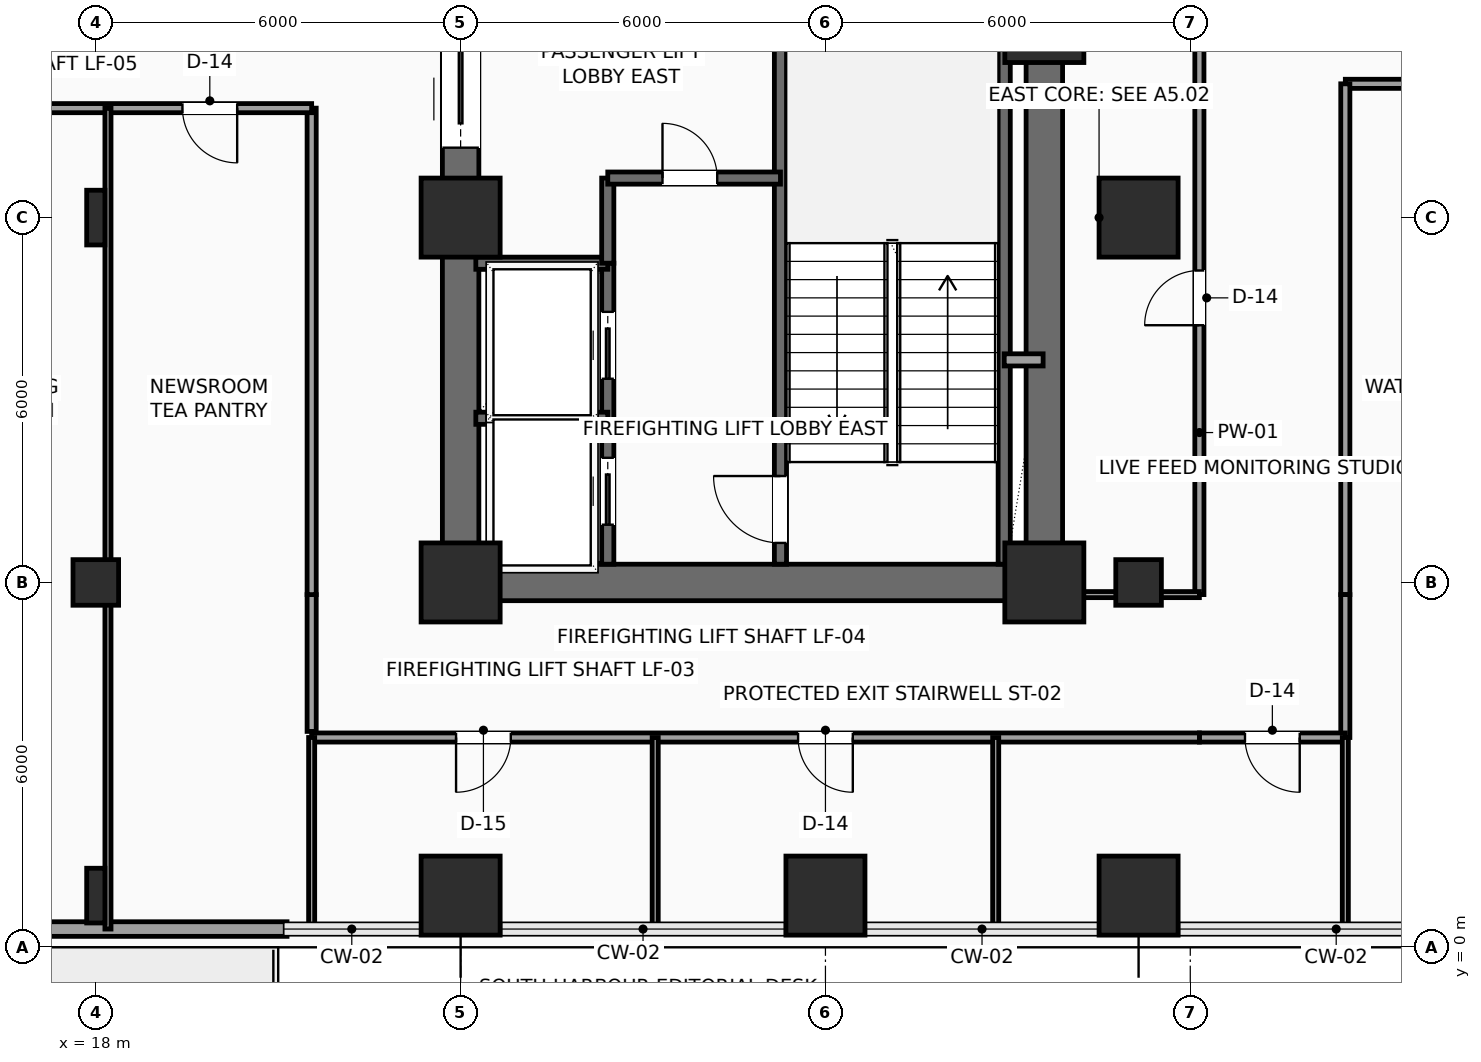
"""IFC4 building model, lengths in metres.
Left out: names, types, materials, properties, quantities, classifications, styles, units other than length and angle.
Written with IfcOpenShell. Run it as: python <this file> out.ifc"""

import sys

from ifc_helpers import new_model, si_unit, direction, frame, frame_2d, origin, origin_2d, place, context, subcontext, project, spatial, rectangle, hollow_rectangle, i_section, extrude, element, fill, save


model = new_model("IFC4")
c1 = context("Model", 3, precision=1e-05, world=origin(), true_north=direction((0.0, 1.0)))
c2 = subcontext(c1, "Body", "Model", "MODEL_VIEW")
j1 = project(units=[si_unit("LENGTHUNIT", "METRE"), si_unit("PLANEANGLEUNIT", "RADIAN")], contexts=[c1])
p1 = place(None, origin())
s1 = spatial("IfcSite", under=j1, at=p1, CompositionType="ELEMENT")
p2 = place(p1, origin())
s2 = spatial("IfcBuilding", under=s1, at=p2, CompositionType="ELEMENT")
p3 = place(p2, frame((0.0, 0.0, 36.3)))
s3 = spatial("IfcBuildingStorey", under=s2, at=p3, CompositionType="ELEMENT", Elevation=36.3)
for number, where, z_axis, x_axis in (
    (1, (24.0, 6.0, 0.0), (0.0, 0.0, 1.0), (1.0, 0.0, 0.0)),
    (2, (24.0, 12.0, 0.0), (0.0, 0.0, 1.0), (1.0, 0.0, 0.0)),
    (3, (33.6, 6.0, 0.0), (0.0, 0.0, 1.0), (1.0, 0.0, 0.0)),
    (4, (33.6, 15.2, 0.0), (0.0, 0.0, 1.0), (1.0, 0.0, 0.0)),
):
    element("IfcColumn", number, at=place(p3, frame(where, z_axis=z_axis, x_axis=x_axis)), inside=s3, PredefinedType="COLUMN", context=c2, shape_type="SweptSolid", body=[
        extrude(rectangle(XDim=1.3, YDim=1.3, at=origin_2d()), origin(), (0.0, 0.0, 1.0), 3.9),
    ])
p4 = place(p3, frame((18.0, 0.85, 0.0), z_axis=(0.0, 0.0, 1.0), x_axis=(1.0, 0.0, 0.0)))
e5 = element("IfcColumn", 5, at=p4, inside=s3, PredefinedType="COLUMN", context=c2, shape_type="SweptSolid", body=[
    extrude(i_section(OverallWidth=0.3, OverallDepth=0.9, WebThickness=0.019, FlangeThickness=0.035, FilletRadius=0.03, at=origin_2d()), origin(), (0.0, 0.0, 1.0), 3.9),
])
p5 = place(p3, frame((18.0, 6.0, 0.0), z_axis=(0.0, 0.0, 1.0), x_axis=(1.0, 0.0, 0.0)))
e6 = element("IfcColumn", 6, at=p5, inside=s3, PredefinedType="COLUMN", context=c2, shape_type="SweptSolid", body=[
    extrude(hollow_rectangle(XDim=0.75, YDim=0.75, WallThickness=0.035, InnerFilletRadius=0.035, OuterFilletRadius=0.05, at=origin_2d()), origin(), (0.0, 0.0, 1.0), 3.9),
])
p6 = place(p3, frame((18.0, 12.0, 0.0), z_axis=(0.0, 0.0, 1.0), x_axis=(1.0, 0.0, 0.0)))
e7 = element("IfcColumn", 7, at=p6, inside=s3, PredefinedType="COLUMN", context=c2, shape_type="SweptSolid", body=[
    extrude(i_section(OverallWidth=0.3, OverallDepth=0.9, WebThickness=0.019, FlangeThickness=0.035, FilletRadius=0.03, at=origin_2d()), origin(), (0.0, 0.0, 1.0), 3.9),
])
for number, where, z_axis, x_axis in (
    (8, (24.0, 0.85, 0.0), (0.0, 0.0, 1.0), (1.0, 0.0, 0.0)),
    (9, (30.0, 0.85, 0.0), (0.0, 0.0, 1.0), (1.0, 0.0, 0.0)),
    (10, (35.15, 0.85, 0.0), (0.0, 0.0, 1.0), (1.0, 0.0, 0.0)),
):
    element("IfcColumn", number, at=place(p3, frame(where, z_axis=z_axis, x_axis=x_axis)), inside=s3, PredefinedType="COLUMN", context=c2, shape_type="SweptSolid", body=[
        extrude(rectangle(XDim=1.3, YDim=1.3, at=origin_2d()), origin(), (0.0, 0.0, 1.0), 3.9),
    ])
p7 = place(p3, frame((35.15, 6.0, 0.0), z_axis=(0.0, 0.0, 1.0), x_axis=(1.0, 0.0, 0.0)))
e11 = element("IfcColumn", 11, at=p7, inside=s3, PredefinedType="COLUMN", context=c2, shape_type="SweptSolid", body=[
    extrude(hollow_rectangle(XDim=0.75, YDim=0.75, WallThickness=0.035, InnerFilletRadius=0.035, OuterFilletRadius=0.05, at=origin_2d()), origin(), (0.0, 0.0, 1.0), 3.9),
])
p8 = place(p3, frame((35.15, 12.0, 0.0), z_axis=(0.0, 0.0, 1.0), x_axis=(1.0, 0.0, 0.0)))
e12 = element("IfcColumn", 12, at=p8, inside=s3, PredefinedType="COLUMN", context=c2, shape_type="SweptSolid", body=[
    extrude(rectangle(XDim=1.3, YDim=1.3, at=origin_2d()), origin(), (0.0, 0.0, 1.0), 3.9),
])
p9 = place(p3, frame((21.145, 0.3, 0.0), z_axis=(0.0, 0.0, 1.0), x_axis=(-1.0, 0.0, 0.0)))
e13 = element("IfcWall", 13, at=p9, inside=s3, PredefinedType="SOLIDWALL", context=c2, shape_type="SweptSolid", body=[
    extrude(rectangle(XDim=9.29, YDim=0.24, at=frame_2d((4.645, 0.0))), origin(), (0.0, 0.0, 1.0), 3.65),
])
p10 = place(p9, frame((3.945, 0.0, 0.0)))
e14 = element("IfcOpeningElement", 14, at=p10, cuts=e13, PredefinedType="OPENING", context=c2, shape_type="SweptSolid", body=[
    extrude(rectangle(XDim=1.05, YDim=2.2, at=frame_2d((0.525, 1.1))), frame((0.0, 0.13, 0.0), z_axis=(0.0, -1.0, 0.0), x_axis=(1.0, 0.0, 0.0)), (0.0, 0.0, 1.0), 0.26),
])
p11 = place(p3, frame((24.0, 6.0, 0.0), z_axis=(0.0, 0.0, 1.0), x_axis=(1.0, 0.0, 0.0)))
e15 = element("IfcWall", 15, at=p11, inside=s3, PredefinedType="SHEAR", context=c2, shape_type="SweptSolid", body=[
    extrude(rectangle(XDim=9.6, YDim=0.6, at=frame_2d((4.8, 0.0))), origin(), (0.0, 0.0, 1.0), 3.65),
])
p12 = place(p3, frame((24.0, 6.0, 0.0), z_axis=(0.0, 0.0, 1.0), x_axis=(0.0, 1.0, 0.0)))
e16 = element("IfcWall", 16, at=p12, inside=s3, PredefinedType="SHEAR", context=c2, shape_type="SweptSolid", body=[
    extrude(rectangle(XDim=12.0, YDim=0.6, at=frame_2d((6.0, 0.0))), origin(), (0.0, 0.0, 1.0), 3.65),
])
p13 = place(p12, frame((7.15, 0.0, 0.0)))
e17 = element("IfcOpeningElement", 17, at=p13, cuts=e16, PredefinedType="OPENING", context=c2, shape_type="SweptSolid", body=[
    extrude(rectangle(XDim=1.6, YDim=2.3, at=frame_2d((0.8, 1.15))), frame((0.0, 0.31, 0.0), z_axis=(0.0, -1.0, 0.0), x_axis=(1.0, 0.0, 0.0)), (0.0, 0.0, 1.0), 0.62),
])
p14 = place(p3, frame((33.6, 6.0, 0.0), z_axis=(0.0, 0.0, 1.0), x_axis=(0.0, 1.0, 0.0)))
e18 = element("IfcWall", 18, at=p14, inside=s3, PredefinedType="SHEAR", context=c2, shape_type="SweptSolid", body=[
    extrude(rectangle(XDim=12.0, YDim=0.6, at=frame_2d((6.0, 0.0))), origin(), (0.0, 0.0, 1.0), 3.65),
])
p15 = place(p14, frame((10.2, 0.0, 0.0)))
e19 = element("IfcOpeningElement", 19, at=p15, cuts=e18, PredefinedType="OPENING", context=c2, shape_type="SweptSolid", body=[
    extrude(rectangle(XDim=0.9, YDim=2.15, at=frame_2d((0.45, 1.075))), frame((0.0, 0.31, 0.0), z_axis=(0.0, -1.0, 0.0), x_axis=(1.0, 0.0, 0.0)), (0.0, 0.0, 1.0), 0.62),
])
p16 = place(p3, frame((29.26, 6.3, 0.0), z_axis=(0.0, 0.0, 1.0), x_axis=(0.0, 1.0, 0.0)))
e20 = element("IfcWall", 20, at=p16, inside=s3, PredefinedType="SHEAR", context=c2, shape_type="SweptSolid", body=[
    extrude(rectangle(XDim=8.88, YDim=0.2, at=frame_2d((4.44, 0.0))), origin(), (0.0, 0.0, 1.0), 3.65),
])
p17 = place(p16, frame((0.35, 0.0, 0.0)))
e21 = element("IfcOpeningElement", 21, at=p17, cuts=e20, PredefinedType="OPENING", context=c2, shape_type="SweptSolid", body=[
    extrude(rectangle(XDim=1.1, YDim=2.2, at=frame_2d((0.55, 1.1))), frame((0.0, 0.11, 0.0), z_axis=(0.0, -1.0, 0.0), x_axis=(1.0, 0.0, 0.0)), (0.0, 0.0, 1.0), 0.22),
])
p18 = place(p3, frame((32.94, 6.3, 0.0), z_axis=(0.0, 0.0, 1.0), x_axis=(0.0, 1.0, 0.0)))
e22 = element("IfcWall", 22, at=p18, inside=s3, PredefinedType="SHEAR", context=c2, shape_type="SweptSolid", body=[
    extrude(rectangle(XDim=8.88, YDim=0.2, at=frame_2d((4.44, 0.0))), origin(), (0.0, 0.0, 1.0), 3.65),
])
p19 = place(p3, frame((26.42, 6.3, 0.0), z_axis=(0.0, 0.0, 1.0), x_axis=(0.0, 1.0, 0.0)))
e23 = element("IfcWall", 23, at=p19, inside=s3, PredefinedType="SHEAR", context=c2, shape_type="SweptSolid", body=[
    extrude(rectangle(XDim=4.95, YDim=0.2, at=frame_2d((2.475, 0.0))), origin(), (0.0, 0.0, 1.0), 3.65),
])
p20 = place(p19, frame((0.65, 0.0, 0.0)))
e24 = element("IfcOpeningElement", 24, at=p20, cuts=e23, PredefinedType="OPENING", context=c2, shape_type="SweptSolid", body=[
    extrude(rectangle(XDim=1.1, YDim=2.2, at=frame_2d((0.55, 1.1))), frame((0.0, 0.11, 0.0), z_axis=(0.0, -1.0, 0.0), x_axis=(1.0, 0.0, 0.0)), (0.0, 0.0, 1.0), 0.22),
])
p21 = place(p19, frame((3.05, 0.0, 0.0)))
e25 = element("IfcOpeningElement", 25, at=p21, cuts=e23, PredefinedType="OPENING", context=c2, shape_type="SweptSolid", body=[
    extrude(rectangle(XDim=1.1, YDim=2.2, at=frame_2d((0.55, 1.1))), frame((0.0, 0.11, 0.0), z_axis=(0.0, -1.0, 0.0), x_axis=(1.0, 0.0, 0.0)), (0.0, 0.0, 1.0), 0.22),
])
for number, where, z_axis, x_axis in (
    (26, (24.25, 8.7, 0.0), (0.0, 0.0, 1.0), (1.0, 0.0, 0.0)),
    (27, (24.25, 11.25, 0.0), (0.0, 0.0, 1.0), (1.0, 0.0, 0.0)),
):
    element("IfcWall", number, at=place(p3, frame(where, z_axis=z_axis, x_axis=x_axis)), inside=s3, PredefinedType="SHEAR", context=c2, shape_type="SweptSolid", body=[
        extrude(rectangle(XDim=2.17, YDim=0.2, at=frame_2d((1.085, 0.0))), origin(), (0.0, 0.0, 1.0), 3.65),
    ])
p22 = place(p3, frame((26.42, 11.25, 0.0), z_axis=(0.0, 0.0, 1.0), x_axis=(0.0, 1.0, 0.0)))
e28 = element("IfcWall", 28, at=p22, inside=s3, PredefinedType="SHEAR", context=c2, shape_type="SweptSolid", body=[
    extrude(rectangle(XDim=1.4, YDim=0.2, at=frame_2d((0.7, 0.0))), origin(), (0.0, 0.0, 1.0), 3.65),
])
p23 = place(p3, frame((26.42, 12.65, 0.0), z_axis=(0.0, 0.0, 1.0), x_axis=(1.0, 0.0, 0.0)))
e29 = element("IfcWall", 29, at=p23, inside=s3, PredefinedType="SHEAR", context=c2, shape_type="SweptSolid", body=[
    extrude(rectangle(XDim=2.84, YDim=0.2, at=frame_2d((1.42, 0.0))), origin(), (0.0, 0.0, 1.0), 3.65),
])
p24 = place(p23, frame((0.9, 0.0, 0.0)))
e30 = element("IfcOpeningElement", 30, at=p24, cuts=e29, PredefinedType="OPENING", context=c2, shape_type="SweptSolid", body=[
    extrude(rectangle(XDim=0.9, YDim=2.15, at=frame_2d((0.45, 1.075))), frame((0.0, 0.11, 0.0), z_axis=(0.0, -1.0, 0.0), x_axis=(1.0, 0.0, 0.0)), (0.0, 0.0, 1.0), 0.22),
])
p25 = place(p3, frame((32.94, 9.66, 0.0), z_axis=(0.0, 0.0, 1.0), x_axis=(1.0, 0.0, 0.0)))
e31 = element("IfcWall", 31, at=p25, inside=s3, PredefinedType="SOLIDWALL", context=c2, shape_type="SweptSolid", body=[
    extrude(rectangle(XDim=0.64, YDim=0.2, at=frame_2d((0.32, 0.0))), origin(), (0.0, 0.0, 1.0), 3.65),
])
p26 = place(p3, frame((36.15, 5.8, 0.0), z_axis=(0.0, 0.0, 1.0), x_axis=(0.0, 1.0, 0.0)))
e32 = element("IfcWall", 32, at=p26, inside=s3, PredefinedType="PARTITIONING", context=c2, shape_type="SweptSolid", body=[
    extrude(rectangle(XDim=10.08, YDim=0.15, at=frame_2d((5.04, 0.0))), origin(), (0.0, 0.0, 1.0), 3.65),
])
p27 = place(p26, frame((4.43, 0.0, 0.0)))
e33 = element("IfcOpeningElement", 33, at=p27, cuts=e32, PredefinedType="OPENING", context=c2, shape_type="SweptSolid", body=[
    extrude(rectangle(XDim=0.9, YDim=2.1, at=frame_2d((0.45, 1.05))), frame((0.0, 0.085, 0.0), z_axis=(0.0, -1.0, 0.0), x_axis=(1.0, 0.0, 0.0)), (0.0, 0.0, 1.0), 0.17),
])
p28 = place(p3, frame((50.9, 14.2, 0.0), z_axis=(0.0, 0.0, 1.0), x_axis=(-1.0, 0.0, 0.0)))
e34 = element("IfcWall", 34, at=p28, inside=s3, PredefinedType="PARTITIONING", context=c2, shape_type="SweptSolid", body=[
    extrude(rectangle(XDim=12.35, YDim=0.15, at=frame_2d((6.175, 0.0))), origin(), (0.0, 0.0, 1.0), 3.65),
])
p29 = place(p28, frame((9.175, 0.0, 0.0)))
e35 = element("IfcOpeningElement", 35, at=p29, cuts=e34, PredefinedType="OPENING", context=c2, shape_type="SweptSolid", body=[
    extrude(rectangle(XDim=0.9, YDim=2.1, at=frame_2d((0.45, 1.05))), frame((0.0, 0.085, 0.0), z_axis=(0.0, -1.0, 0.0), x_axis=(1.0, 0.0, 0.0)), (0.0, 0.0, 1.0), 0.17),
])
p30 = place(p28, frame((3.0, 0.0, 0.0)))
e36 = element("IfcOpeningElement", 36, at=p30, cuts=e34, PredefinedType="OPENING", context=c2, shape_type="SweptSolid", body=[
    extrude(rectangle(XDim=0.9, YDim=2.1, at=frame_2d((0.45, 1.05))), frame((0.0, 0.085, 0.0), z_axis=(0.0, -1.0, 0.0), x_axis=(1.0, 0.0, 0.0)), (0.0, 0.0, 1.0), 0.17),
])
p31 = place(p3, frame((38.55, 14.2, 0.0), z_axis=(0.0, 0.0, 1.0), x_axis=(0.0, -1.0, 0.0)))
e37 = element("IfcWall", 37, at=p31, inside=s3, PredefinedType="PARTITIONING", context=c2, shape_type="SweptSolid", body=[
    extrude(rectangle(XDim=8.4, YDim=0.15, at=frame_2d((4.2, 0.0))), origin(), (0.0, 0.0, 1.0), 3.65),
])
p32 = place(p3, frame((38.55, 5.8, 0.0), z_axis=(0.0, 0.0, 1.0), x_axis=(0.0, -1.0, 0.0)))
e38 = element("IfcWall", 38, at=p32, inside=s3, PredefinedType="PARTITIONING", context=c2, shape_type="SweptSolid", body=[
    extrude(rectangle(XDim=2.35, YDim=0.15, at=frame_2d((1.175, 0.0))), origin(), (0.0, 0.0, 1.0), 3.65),
])
p33 = place(p3, frame((38.55, 3.45, 0.0), z_axis=(0.0, 0.0, 1.0), x_axis=(-1.0, 0.0, 0.0)))
e39 = element("IfcWall", 39, at=p33, inside=s3, PredefinedType="PARTITIONING", context=c2, shape_type="SweptSolid", body=[
    extrude(rectangle(XDim=2.4, YDim=0.15, at=frame_2d((1.2, 0.0))), origin(), (0.0, 0.0, 1.0), 3.142),
])
p34 = place(p33, frame((0.75, 0.0, 0.0)))
e40 = element("IfcOpeningElement", 40, at=p34, cuts=e39, PredefinedType="OPENING", context=c2, shape_type="SweptSolid", body=[
    extrude(rectangle(XDim=0.9, YDim=2.1, at=frame_2d((0.45, 1.05))), frame((0.0, 0.085, 0.0), z_axis=(0.0, -1.0, 0.0), x_axis=(1.0, 0.0, 0.0)), (0.0, 0.0, 1.0), 0.17),
])
p35 = place(p3, frame((36.15, 3.45, 0.0), z_axis=(0.0, 0.0, 1.0), x_axis=(-1.0, 0.0, 0.0)))
e41 = element("IfcWall", 41, at=p35, inside=s3, PredefinedType="PARTITIONING", context=c2, shape_type="SweptSolid", body=[
    extrude(rectangle(XDim=14.6, YDim=0.15, at=frame_2d((7.3, 0.0))), origin(), (0.0, 0.0, 1.0), 3.142),
])
p36 = place(p35, frame((11.325, 0.0, 0.0)))
e42 = element("IfcOpeningElement", 42, at=p36, cuts=e41, PredefinedType="OPENING", context=c2, shape_type="SweptSolid", body=[
    extrude(rectangle(XDim=0.9, YDim=2.1, at=frame_2d((0.45, 1.05))), frame((0.0, 0.085, 0.0), z_axis=(0.0, -1.0, 0.0), x_axis=(1.0, 0.0, 0.0)), (0.0, 0.0, 1.0), 0.17),
])
p37 = place(p35, frame((5.7, 0.0, 0.0)))
e43 = element("IfcOpeningElement", 43, at=p37, cuts=e41, PredefinedType="OPENING", context=c2, shape_type="SweptSolid", body=[
    extrude(rectangle(XDim=0.9, YDim=2.1, at=frame_2d((0.45, 1.05))), frame((0.0, 0.085, 0.0), z_axis=(0.0, -1.0, 0.0), x_axis=(1.0, 0.0, 0.0)), (0.0, 0.0, 1.0), 0.17),
])
p38 = place(p3, frame((21.55, 3.55, 0.0), z_axis=(0.0, 0.0, 1.0), x_axis=(0.0, 1.0, 0.0)))
e44 = element("IfcWall", 44, at=p38, inside=s3, PredefinedType="PARTITIONING", context=c2, shape_type="SweptSolid", body=[
    extrude(rectangle(XDim=2.25, YDim=0.15, at=frame_2d((1.125, 0.0))), origin(), (0.0, 0.0, 1.0), 3.65),
])
p39 = place(p3, frame((21.55, 5.8, 0.0), z_axis=(0.0, 0.0, 1.0), x_axis=(0.0, 1.0, 0.0)))
e45 = element("IfcWall", 45, at=p39, inside=s3, PredefinedType="PARTITIONING", context=c2, shape_type="SweptSolid", body=[
    extrude(rectangle(XDim=8.0, YDim=0.15, at=frame_2d((4.0, 0.0))), origin(), (0.0, 0.0, 1.0), 3.65),
])
p40 = place(p3, frame((21.55, 13.8, 0.0), z_axis=(0.0, 0.0, 1.0), x_axis=(-1.0, 0.0, 0.0)))
e46 = element("IfcWall", 46, at=p40, inside=s3, PredefinedType="PARTITIONING", context=c2, shape_type="SweptSolid", body=[
    extrude(rectangle(XDim=8.95, YDim=0.15, at=frame_2d((4.475, 0.0))), origin(), (0.0, 0.0, 1.0), 3.65),
])
p41 = place(p40, frame((5.4, 0.0, 0.0)))
e47 = element("IfcOpeningElement", 47, at=p41, cuts=e46, PredefinedType="OPENING", context=c2, shape_type="SweptSolid", body=[
    extrude(rectangle(XDim=0.9, YDim=2.1, at=frame_2d((0.45, 1.05))), frame((0.0, 0.085, 0.0), z_axis=(0.0, -1.0, 0.0), x_axis=(1.0, 0.0, 0.0)), (0.0, 0.0, 1.0), 0.17),
])
p42 = place(p40, frame((1.225, 0.0, 0.0)))
e48 = element("IfcOpeningElement", 48, at=p42, cuts=e46, PredefinedType="OPENING", context=c2, shape_type="SweptSolid", body=[
    extrude(rectangle(XDim=0.9, YDim=2.1, at=frame_2d((0.45, 1.05))), frame((0.0, 0.085, 0.0), z_axis=(0.0, -1.0, 0.0), x_axis=(1.0, 0.0, 0.0)), (0.0, 0.0, 1.0), 0.17),
])
p43 = place(p3, frame((18.2, 0.3, 0.0), z_axis=(0.0, 0.0, 1.0), x_axis=(0.0, 1.0, 0.0)))
e49 = element("IfcWall", 49, at=p43, inside=s3, PredefinedType="PARTITIONING", context=c2, shape_type="SweptSolid", body=[
    extrude(rectangle(XDim=13.5, YDim=0.1, at=frame_2d((6.75, 0.0))), origin(), (0.0, 0.0, 1.0), 2.992),
])
for number, where, z_axis, x_axis in (
    (50, (21.55, 0.3, 0.0), (0.0, 0.0, 1.0), (0.0, 1.0, 0.0)),
    (51, (27.2, 0.3, 0.0), (0.0, 0.0, 1.0), (0.0, 1.0, 0.0)),
    (52, (32.8, 0.3, 0.0), (0.0, 0.0, 1.0), (0.0, 1.0, 0.0)),
    (53, (38.55, 0.3, 0.0), (0.0, 0.0, 1.0), (0.0, 1.0, 0.0)),
):
    element("IfcWall", number, at=place(p3, frame(where, z_axis=z_axis, x_axis=x_axis)), inside=s3, PredefinedType="PARTITIONING", context=c2, shape_type="SweptSolid", body=[
        extrude(rectangle(XDim=3.15, YDim=0.1, at=frame_2d((1.575, 0.0))), origin(), (0.0, 0.0, 1.0), 3.65),
    ])
p44 = place(p3, frame((33.65, 5.8, 0.0), z_axis=(0.0, 0.0, 1.0), x_axis=(1.0, 0.0, 0.0)))
e54 = element("IfcWall", 54, at=p44, inside=s3, PredefinedType="PARTITIONING", context=c2, shape_type="SweptSolid", body=[
    extrude(rectangle(XDim=2.5, YDim=0.1, at=frame_2d((1.25, 0.0))), origin(), (0.0, 0.0, 1.0), 2.992),
])
p45 = place(p13, origin())
e55 = element("IfcDoor", 55, at=p45, inside=s3, OperationType="DOUBLE_DOOR_SLIDING", PredefinedType="DOOR", context=c2, shape_type="SweptSolid", body=[
    extrude(rectangle(XDim=1.6, YDim=2.3, at=frame_2d((0.8, 1.15))), frame((0.0, 0.025, 0.0), z_axis=(0.0, -1.0, 0.0), x_axis=(1.0, 0.0, 0.0)), (0.0, 0.0, 1.0), 0.05),
])
fill(e17, e55)
p46 = place(p17, origin())
e56 = element("IfcDoor", 56, at=p46, inside=s3, OperationType="SINGLE_SWING_RIGHT", PredefinedType="DOOR", context=c2, shape_type="SweptSolid", body=[
    extrude(rectangle(XDim=1.1, YDim=2.2, at=frame_2d((0.55, 1.1))), frame((0.0, 0.025, 0.0), z_axis=(0.0, -1.0, 0.0), x_axis=(1.0, 0.0, 0.0)), (0.0, 0.0, 1.0), 0.05),
])
fill(e21, e56)
p47 = place(p20, origin())
e57 = element("IfcDoor", 57, at=p47, inside=s3, OperationType="SLIDING_TO_LEFT", PredefinedType="DOOR", context=c2, shape_type="SweptSolid", body=[
    extrude(rectangle(XDim=1.1, YDim=2.2, at=frame_2d((0.55, 1.1))), frame((0.0, 0.025, 0.0), z_axis=(0.0, -1.0, 0.0), x_axis=(1.0, 0.0, 0.0)), (0.0, 0.0, 1.0), 0.05),
])
fill(e24, e57)
p48 = place(p21, origin())
e58 = element("IfcDoor", 58, at=p48, inside=s3, OperationType="SLIDING_TO_LEFT", PredefinedType="DOOR", context=c2, shape_type="SweptSolid", body=[
    extrude(rectangle(XDim=1.1, YDim=2.2, at=frame_2d((0.55, 1.1))), frame((0.0, 0.025, 0.0), z_axis=(0.0, -1.0, 0.0), x_axis=(1.0, 0.0, 0.0)), (0.0, 0.0, 1.0), 0.05),
])
fill(e25, e58)
p49 = place(p24, origin())
e59 = element("IfcDoor", 59, at=p49, inside=s3, OperationType="SINGLE_SWING_LEFT", PredefinedType="DOOR", context=c2, shape_type="SweptSolid", body=[
    extrude(rectangle(XDim=0.9, YDim=2.15, at=frame_2d((0.45, 1.075))), frame((0.0, 0.025, 0.0), z_axis=(0.0, -1.0, 0.0), x_axis=(1.0, 0.0, 0.0)), (0.0, 0.0, 1.0), 0.05),
])
fill(e30, e59)
p50 = place(p27, origin())
e60 = element("IfcDoor", 60, at=p50, inside=s3, OperationType="SINGLE_SWING_LEFT", PredefinedType="DOOR", context=c2, shape_type="SweptSolid", body=[
    extrude(rectangle(XDim=0.9, YDim=2.1, at=frame_2d((0.45, 1.05))), frame((0.0, 0.025, 0.0), z_axis=(0.0, -1.0, 0.0), x_axis=(1.0, 0.0, 0.0)), (0.0, 0.0, 1.0), 0.05),
])
fill(e33, e60)
p51 = place(p34, origin())
e61 = element("IfcDoor", 61, at=p51, inside=s3, OperationType="SINGLE_SWING_LEFT", PredefinedType="DOOR", context=c2, shape_type="SweptSolid", body=[
    extrude(rectangle(XDim=0.9, YDim=2.1, at=frame_2d((0.45, 1.05))), frame((0.0, 0.025, 0.0), z_axis=(0.0, -1.0, 0.0), x_axis=(1.0, 0.0, 0.0)), (0.0, 0.0, 1.0), 0.05),
])
fill(e40, e61)
p52 = place(p36, origin())
e62 = element("IfcDoor", 62, at=p52, inside=s3, OperationType="SINGLE_SWING_RIGHT", PredefinedType="DOOR", context=c2, shape_type="SweptSolid", body=[
    extrude(rectangle(XDim=0.9, YDim=2.1, at=frame_2d((0.45, 1.05))), frame((0.0, 0.025, 0.0), z_axis=(0.0, -1.0, 0.0), x_axis=(1.0, 0.0, 0.0)), (0.0, 0.0, 1.0), 0.05),
])
fill(e42, e62)
p53 = place(p37, origin())
e63 = element("IfcDoor", 63, at=p53, inside=s3, OperationType="SINGLE_SWING_LEFT", PredefinedType="DOOR", context=c2, shape_type="SweptSolid", body=[
    extrude(rectangle(XDim=0.9, YDim=2.1, at=frame_2d((0.45, 1.05))), frame((0.0, 0.025, 0.0), z_axis=(0.0, -1.0, 0.0), x_axis=(1.0, 0.0, 0.0)), (0.0, 0.0, 1.0), 0.05),
])
fill(e43, e63)
p54 = place(p42, origin())
e64 = element("IfcDoor", 64, at=p54, inside=s3, OperationType="SINGLE_SWING_LEFT", PredefinedType="DOOR", context=c2, shape_type="SweptSolid", body=[
    extrude(rectangle(XDim=0.9, YDim=2.1, at=frame_2d((0.45, 1.05))), frame((0.0, 0.025, 0.0), z_axis=(0.0, -1.0, 0.0), x_axis=(1.0, 0.0, 0.0)), (0.0, 0.0, 1.0), 0.05),
])
fill(e48, e64)
save(model, sys.argv[1])
